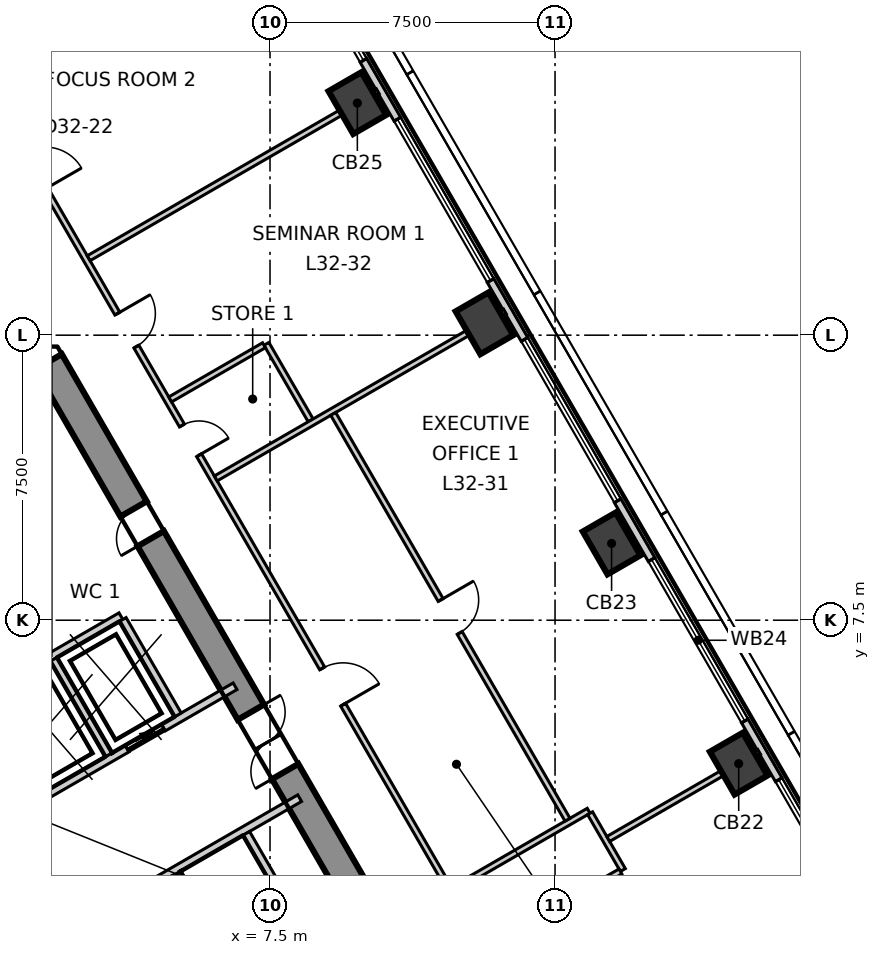
"""IFC4 building model, lengths in metres.
Left out: names, types, materials, properties, quantities, classifications, styles, units other than length and angle.
Written with IfcOpenShell. Run it as: python <this file> out.ifc"""

import sys

from ifc_helpers import new_model, si_unit, direction, frame, frame_2d, origin, origin_2d, place, context, subcontext, project, spatial, polyline, rectangle, outline, extrude, element, fill, save


model = new_model("IFC4")
c1 = context("Model", 3, precision=1e-05, world=origin(), true_north=direction((0.0, 1.0)))
c2 = subcontext(c1, "Body", "Model", "MODEL_VIEW")
j1 = project(units=[si_unit("LENGTHUNIT", "METRE"), si_unit("PLANEANGLEUNIT", "RADIAN")], contexts=[c1])
p1 = place(None, origin())
s1 = spatial("IfcSite", under=j1, at=p1, CompositionType="ELEMENT")
p2 = place(p1, origin())
s2 = spatial("IfcBuilding", under=s1, at=p2, CompositionType="ELEMENT")
p3 = place(p2, frame((0.0, 0.0, 140.3)))
s3 = spatial("IfcBuildingStorey", under=s2, at=p3, CompositionType="ELEMENT", Elevation=140.3)
p4 = place(p3, frame((1.674, 14.3, -0.3), z_axis=(0.0, 0.0, 1.0), x_axis=(-1.0, 0.0, 0.0)))
e1 = element("IfcWall", 1, at=p4, inside=s3, PredefinedType="SHEAR", context=c2, shape_type="SweptSolid", body=[
    extrude(outline(polyline([(-0.231, -0.4), (1.674, -0.4), (3.579, -0.4), (3.117, 0.4), (1.674, 0.4), (0.231, 0.4), (-0.231, -0.4)])), origin(), (0.0, 0.0, 1.0), 4.0),
])
p5 = place(p4, frame((0.974, 0.0, 0.3)))
e2 = element("IfcOpeningElement", 2, at=p5, cuts=e1, PredefinedType="OPENING", context=c2, shape_type="SweptSolid", body=[
    extrude(rectangle(XDim=1.4, YDim=2.1, at=frame_2d((0.7, 1.05))), frame((0.0, 0.41, 0.0), z_axis=(0.0, -1.0, 0.0), x_axis=(1.0, 0.0, 0.0)), (0.0, 0.0, 1.0), 0.82),
])
p6 = place(p3, frame((13.221, -5.7, -0.3), z_axis=(0.0, 0.0, 1.0), x_axis=(-0.499995765644, 0.866027848477, 0.0)))
e3 = element("IfcWall", 3, at=p6, inside=s3, PredefinedType="SHEAR", context=c2, shape_type="SweptSolid", body=[
    extrude(outline(polyline([(-0.231, -0.4), (1.732, -0.4), (3.695, -0.4), (5.658, -0.4), (7.621, -0.4), (9.584, -0.4), (11.547, -0.4), (13.51, -0.4), (15.473, -0.4), (17.436, -0.4), (19.399, -0.4), (21.362, -0.4), (23.325, -0.4), (22.863, 0.4), (20.977, 0.4), (19.091, 0.4), (17.205, 0.4), (15.319, 0.4), (13.433, 0.4), (11.547, 0.4), (9.661, 0.4), (7.775, 0.4), (5.889, 0.4), (4.003, 0.4), (2.117, 0.4), (0.231, 0.4), (-0.231, -0.4)])), origin(), (0.0, 0.0, 1.0), 4.0),
])
p7 = place(p6, frame((10.647, 0.0, 0.3)))
e4 = element("IfcOpeningElement", 4, at=p7, cuts=e3, PredefinedType="OPENING", context=c2, shape_type="SweptSolid", body=[
    extrude(rectangle(XDim=1.8, YDim=2.1, at=frame_2d((0.9, 1.05))), frame((0.0, 0.41, 0.0), z_axis=(0.0, -1.0, 0.0), x_axis=(1.0, 0.0, 0.0)), (0.0, 0.0, 1.0), 0.82),
])
p8 = place(p6, frame((17.721, 0.0, 0.3)))
e5 = element("IfcOpeningElement", 5, at=p8, cuts=e3, PredefinedType="OPENING", context=c2, shape_type="SweptSolid", body=[
    extrude(rectangle(XDim=0.9, YDim=2.1, at=frame_2d((0.45, 1.05))), frame((0.0, 0.41, 0.0), z_axis=(0.0, -1.0, 0.0), x_axis=(1.0, 0.0, 0.0)), (0.0, 0.0, 1.0), 0.82),
])
for number, where, z_axis, x_axis in (
    (6, (19.833, 3.726, -0.3), (0.0, 0.0, 1.0), (-0.5, 0.866, 0.0)),
    (7, (16.488, 9.52, -0.3), (0.0, 0.0, 1.0), (-0.5, 0.866, 0.0)),
    (8, (13.143, 15.313, -0.3), (0.0, 0.0, 1.0), (-0.5, 0.866, 0.0)),
    (9, (9.798, 21.107, -0.3), (0.0, 0.0, 1.0), (-0.5, 0.866, 0.0)),
):
    element("IfcColumn", number, at=place(p3, frame(where, z_axis=z_axis, x_axis=x_axis)), inside=s3, PredefinedType="COLUMN", context=c2, shape_type="SweptSolid", body=[
        extrude(rectangle(XDim=1.3, YDim=1.0, at=origin_2d()), origin(), (0.0, 0.0, 1.0), 4.0),
    ])
p9 = place(p3, frame((31.126, -14.433, 0.0), z_axis=(0.0, 0.0, 1.0), x_axis=(-0.500008098571, 0.866020728022, 0.0)))
e10 = element("IfcWall", 10, at=p9, inside=s3, PredefinedType="ELEMENTEDWALL", context=c2, shape_type="SweptSolid", body=[
    extrude(rectangle(XDim=56.105, YDim=0.2, at=frame_2d((28.052, 0.0))), origin(), (0.0, 0.0, 1.0), 3.7),
])
p10 = place(p9, frame((2.198, 0.0, 0.9)))
e11 = element("IfcOpeningElement", 11, at=p10, cuts=e10, PredefinedType="OPENING", context=c2, shape_type="SweptSolid", body=[
    extrude(rectangle(XDim=4.9, YDim=2.5, at=frame_2d((2.45, 1.25))), frame((0.0, 0.11, 0.0), z_axis=(0.0, -1.0, 0.0), x_axis=(1.0, 0.0, 0.0)), (0.0, 0.0, 1.0), 0.22),
])
p11 = place(p9, frame((8.888, 0.0, 0.9)))
e12 = element("IfcOpeningElement", 12, at=p11, cuts=e10, PredefinedType="OPENING", context=c2, shape_type="SweptSolid", body=[
    extrude(rectangle(XDim=4.9, YDim=2.5, at=frame_2d((2.45, 1.25))), frame((0.0, 0.11, 0.0), z_axis=(0.0, -1.0, 0.0), x_axis=(1.0, 0.0, 0.0)), (0.0, 0.0, 1.0), 0.22),
])
p12 = place(p9, frame((15.578, 0.0, 0.9)))
e13 = element("IfcOpeningElement", 13, at=p12, cuts=e10, PredefinedType="OPENING", context=c2, shape_type="SweptSolid", body=[
    extrude(rectangle(XDim=4.9, YDim=2.5, at=frame_2d((2.45, 1.25))), frame((0.0, 0.11, 0.0), z_axis=(0.0, -1.0, 0.0), x_axis=(1.0, 0.0, 0.0)), (0.0, 0.0, 1.0), 0.22),
])
p13 = place(p9, frame((22.267, 0.0, 0.9)))
e14 = element("IfcOpeningElement", 14, at=p13, cuts=e10, PredefinedType="OPENING", context=c2, shape_type="SweptSolid", body=[
    extrude(rectangle(XDim=4.9, YDim=2.5, at=frame_2d((2.45, 1.25))), frame((0.0, 0.11, 0.0), z_axis=(0.0, -1.0, 0.0), x_axis=(1.0, 0.0, 0.0)), (0.0, 0.0, 1.0), 0.22),
])
p14 = place(p9, frame((28.957, 0.0, 0.9)))
e15 = element("IfcOpeningElement", 15, at=p14, cuts=e10, PredefinedType="OPENING", context=c2, shape_type="SweptSolid", body=[
    extrude(rectangle(XDim=4.9, YDim=2.5, at=frame_2d((2.45, 1.25))), frame((0.0, 0.11, 0.0), z_axis=(0.0, -1.0, 0.0), x_axis=(1.0, 0.0, 0.0)), (0.0, 0.0, 1.0), 0.22),
])
p15 = place(p9, frame((35.647, 0.0, 0.9)))
e16 = element("IfcOpeningElement", 16, at=p15, cuts=e10, PredefinedType="OPENING", context=c2, shape_type="SweptSolid", body=[
    extrude(rectangle(XDim=4.9, YDim=2.5, at=frame_2d((2.45, 1.25))), frame((0.0, 0.11, 0.0), z_axis=(0.0, -1.0, 0.0), x_axis=(1.0, 0.0, 0.0)), (0.0, 0.0, 1.0), 0.22),
])
p16 = place(p9, frame((42.337, 0.0, 0.9)))
e17 = element("IfcOpeningElement", 17, at=p16, cuts=e10, PredefinedType="OPENING", context=c2, shape_type="SweptSolid", body=[
    extrude(rectangle(XDim=4.9, YDim=2.5, at=frame_2d((2.45, 1.25))), frame((0.0, 0.11, 0.0), z_axis=(0.0, -1.0, 0.0), x_axis=(1.0, 0.0, 0.0)), (0.0, 0.0, 1.0), 0.22),
])
p17 = place(p9, frame((49.027, 0.0, 0.9)))
e18 = element("IfcOpeningElement", 18, at=p17, cuts=e10, PredefinedType="OPENING", context=c2, shape_type="SweptSolid", body=[
    extrude(rectangle(XDim=4.9, YDim=2.5, at=frame_2d((2.45, 1.25))), frame((0.0, 0.11, 0.0), z_axis=(0.0, -1.0, 0.0), x_axis=(1.0, 0.0, 0.0)), (0.0, 0.0, 1.0), 0.22),
])
p18 = place(p3, frame((0.076, 21.468, 0.0), z_axis=(0.0, 0.0, 1.0), x_axis=(0.499999691263, -0.866025582034, 0.0)))
e19 = element("IfcWall", 19, at=p18, inside=s3, PredefinedType="PARTITIONING", context=c2, shape_type="SweptSolid", body=[
    extrude(rectangle(XDim=24.342, YDim=0.15, at=frame_2d((12.171, 0.0))), origin(), (0.0, 0.0, 1.0), 3.7),
])
p19 = place(p18, frame((17.594, 0.0, 0.0)))
e20 = element("IfcOpeningElement", 20, at=p19, cuts=e19, PredefinedType="OPENING", context=c2, shape_type="SweptSolid", body=[
    extrude(rectangle(XDim=1.1, YDim=2.1, at=frame_2d((0.55, 1.05))), frame((0.0, 0.085, 0.0), z_axis=(0.0, -1.0, 0.0), x_axis=(1.0, 0.0, 0.0)), (0.0, 0.0, 1.0), 0.17),
])
p20 = place(p18, frame((6.814, 0.0, 0.0)))
e21 = element("IfcOpeningElement", 21, at=p20, cuts=e19, PredefinedType="OPENING", context=c2, shape_type="SweptSolid", body=[
    extrude(rectangle(XDim=1.0, YDim=2.1, at=frame_2d((0.5, 1.05))), frame((0.0, 0.085, 0.0), z_axis=(0.0, -1.0, 0.0), x_axis=(1.0, 0.0, 0.0)), (0.0, 0.0, 1.0), 0.17),
])
p21 = place(p18, frame((10.214, 0.0, 0.0)))
e22 = element("IfcOpeningElement", 22, at=p21, cuts=e19, PredefinedType="OPENING", context=c2, shape_type="SweptSolid", body=[
    extrude(rectangle(XDim=0.9, YDim=2.1, at=frame_2d((0.45, 1.05))), frame((0.0, 0.085, 0.0), z_axis=(0.0, -1.0, 0.0), x_axis=(1.0, 0.0, 0.0)), (0.0, 0.0, 1.0), 0.17),
])
p22 = place(p18, frame((1.924, 0.0, 0.0)))
e23 = element("IfcOpeningElement", 23, at=p22, cuts=e19, PredefinedType="OPENING", context=c2, shape_type="SweptSolid", body=[
    extrude(rectangle(XDim=1.1, YDim=2.1, at=frame_2d((0.55, 1.05))), frame((0.0, 0.085, 0.0), z_axis=(0.0, -1.0, 0.0), x_axis=(1.0, 0.0, 0.0)), (0.0, 0.0, 1.0), 0.17),
])
p23 = place(p3, frame((2.728, 17.025, 0.0), z_axis=(0.0, 0.0, 1.0), x_axis=(0.866014327354, 0.50001918445, 0.0)))
e24 = element("IfcWall", 24, at=p23, inside=s3, PredefinedType="PARTITIONING", context=c2, shape_type="SweptSolid", body=[
    extrude(rectangle(XDim=8.784, YDim=0.15, at=frame_2d((4.392, 0.0))), origin(), (0.0, 0.0, 1.0), 3.7),
])
p24 = place(p3, frame((7.406, 14.772, 0.0), z_axis=(0.0, 0.0, 1.0), x_axis=(0.50029509392, -0.865854964183, 0.0)))
e25 = element("IfcWall", 25, at=p24, inside=s3, PredefinedType="PARTITIONING", context=c2, shape_type="SweptSolid", body=[
    extrude(rectangle(XDim=2.325, YDim=0.15, at=frame_2d((1.162, 0.0))), origin(), (0.0, 0.0, 1.0), 3.7),
])
p25 = place(p3, frame((4.873, 13.31, 0.0), z_axis=(0.0, 0.0, 1.0), x_axis=(0.866004402611, 0.500036373335, 0.0)))
e26 = element("IfcWall", 26, at=p25, inside=s3, PredefinedType="PARTITIONING", context=c2, shape_type="SweptSolid", body=[
    extrude(rectangle(XDim=2.85, YDim=0.15, at=frame_2d((1.425, 0.0))), origin(), (0.0, 0.0, 1.0), 3.7),
])
p26 = place(p3, frame((6.073, 11.231, 0.0), z_axis=(0.0, 0.0, 1.0), x_axis=(0.866014327354, 0.50001918445, 0.0)))
e27 = element("IfcWall", 27, at=p26, inside=s3, PredefinedType="PARTITIONING", context=c2, shape_type="SweptSolid", body=[
    extrude(rectangle(XDim=8.784, YDim=0.15, at=frame_2d((4.392, 0.0))), origin(), (0.0, 0.0, 1.0), 3.7),
])
p27 = place(p3, frame((12.314, 0.424, 0.0), z_axis=(0.0, 0.0, 1.0), x_axis=(0.865997263264, 0.500048737644, 0.0)))
e28 = element("IfcWall", 28, at=p27, inside=s3, PredefinedType="PARTITIONING", context=c2, shape_type="SweptSolid", body=[
    extrude(rectangle(XDim=4.124, YDim=0.15, at=frame_2d((2.062, 0.0))), origin(), (0.0, 0.0, 1.0), 3.7),
])
p28 = place(p3, frame((15.923, 2.421, 0.0), z_axis=(0.0, 0.0, 1.0), x_axis=(0.499702028684, -0.866197369269, 0.0)))
e29 = element("IfcWall", 29, at=p28, inside=s3, PredefinedType="PARTITIONING", context=c2, shape_type="SweptSolid", body=[
    extrude(rectangle(XDim=1.725, YDim=0.15, at=frame_2d((0.862, 0.0))), origin(), (0.0, 0.0, 1.0), 3.7),
])
p29 = place(p3, frame((16.4, 1.744, 0.0), z_axis=(0.0, 0.0, 1.0), x_axis=(0.866045467449, 0.499965247104, 0.0)))
e30 = element("IfcWall", 30, at=p29, inside=s3, PredefinedType="PARTITIONING", context=c2, shape_type="SweptSolid", body=[
    extrude(rectangle(XDim=4.584, YDim=0.15, at=frame_2d((2.292, 0.0))), origin(), (0.0, 0.0, 1.0), 3.7),
])
p30 = place(p3, frame((13.214, -1.135, 0.0), z_axis=(0.0, 0.0, 1.0), x_axis=(0.865940524948, 0.500146985649, 0.0)))
e31 = element("IfcWall", 31, at=p30, inside=s3, PredefinedType="PARTITIONING", context=c2, shape_type="SweptSolid", body=[
    extrude(rectangle(XDim=4.049, YDim=0.15, at=frame_2d((2.024, 0.0))), origin(), (0.0, 0.0, 1.0), 3.7),
])
p31 = place(p3, frame((9.163, 12.929, 0.0), z_axis=(0.0, 0.0, 1.0), x_axis=(0.499991554064, -0.866030279993, 0.0)))
e32 = element("IfcWall", 32, at=p31, inside=s3, PredefinedType="PARTITIONING", context=c2, shape_type="SweptSolid", body=[
    extrude(rectangle(XDim=12.33, YDim=0.15, at=frame_2d((6.165, 0.0))), origin(), (0.0, 0.0, 1.0), 3.7),
])
p32 = place(p31, frame((5.655, 0.0, 0.0)))
e33 = element("IfcOpeningElement", 33, at=p32, cuts=e32, PredefinedType="OPENING", context=c2, shape_type="SweptSolid", body=[
    extrude(rectangle(XDim=1.0, YDim=2.1, at=frame_2d((0.5, 1.05))), frame((0.0, 0.085, 0.0), z_axis=(0.0, -1.0, 0.0), x_axis=(1.0, 0.0, 0.0)), (0.0, 0.0, 1.0), 0.17),
])
p33 = place(p3, frame((-0.002, 5.542, 0.0), z_axis=(0.0, 0.0, 1.0), x_axis=(0.866103910842, 0.499863997127, 0.0)))
e34 = element("IfcWall", 34, at=p33, inside=s3, PredefinedType="SOLIDWALL", context=c2, shape_type="SweptSolid", body=[
    extrude(rectangle(XDim=4.131, YDim=0.2, at=frame_2d((2.065, 0.0))), origin(), (0.0, 0.0, 1.0), 3.7),
])
p34 = place(p3, frame((1.577, 2.874, 0.0), z_axis=(0.0, 0.0, 1.0), x_axis=(0.866073694534, 0.499916348638, 0.0)))
e35 = element("IfcWall", 35, at=p34, inside=s3, PredefinedType="SOLIDWALL", context=c2, shape_type="SweptSolid", body=[
    extrude(rectangle(XDim=5.777, YDim=0.2, at=frame_2d((2.888, 0.0))), origin(), (0.0, 0.0, 1.0), 3.7),
])
p35 = place(p34, frame((2.497, 0.0, 0.0)))
e36 = element("IfcOpeningElement", 36, at=p35, cuts=e35, PredefinedType="OPENING", context=c2, shape_type="SweptSolid", body=[
    extrude(rectangle(XDim=1.1, YDim=2.1, at=frame_2d((0.55, 1.05))), frame((0.0, 0.11, 0.0), z_axis=(0.0, -1.0, 0.0), x_axis=(1.0, 0.0, 0.0)), (0.0, 0.0, 1.0), 0.22),
])
p36 = place(p3, frame((3.278, -0.071, 0.0), z_axis=(0.0, 0.0, 1.0), x_axis=(0.865929348003, 0.5001663366, 0.0)))
e37 = element("IfcWall", 37, at=p36, inside=s3, PredefinedType="SOLIDWALL", context=c2, shape_type="SweptSolid", body=[
    extrude(rectangle(XDim=5.776, YDim=0.2, at=frame_2d((2.888, 0.0))), origin(), (0.0, 0.0, 1.0), 3.7),
])
p37 = place(p3, frame((3.626, 7.52, 0.0), z_axis=(0.0, 0.0, 1.0), x_axis=(0.500060147554, -0.865990674793, 0.0)))
e38 = element("IfcWall", 38, at=p37, inside=s3, PredefinedType="SOLIDWALL", context=c2, shape_type="SweptSolid", body=[
    extrude(rectangle(XDim=2.9, YDim=0.2, at=frame_2d((1.45, 0.0))), origin(), (0.0, 0.0, 1.0), 3.7),
])
p38 = place(p3, frame((6.876, 1.891, 0.0), z_axis=(0.0, 0.0, 1.0), x_axis=(0.499990139034, -0.866031096941, 0.0)))
e39 = element("IfcWall", 39, at=p38, inside=s3, PredefinedType="SOLIDWALL", context=c2, shape_type="SweptSolid", body=[
    extrude(rectangle(XDim=3.0, YDim=0.2, at=frame_2d((1.5, 0.0))), origin(), (0.0, 0.0, 1.0), 3.7),
])
for number, where, z_axis, x_axis in (
    (40, (1.807, 6.47, 0.0), (0.0, 0.0, 1.0), (0.5, -0.866, 0.0)),
    (41, (5.057, 0.841, 0.0), (0.0, 0.0, 1.0), (0.5, -0.866, 0.0)),
):
    element("IfcWall", number, at=place(p3, frame(where, z_axis=z_axis, x_axis=x_axis)), inside=s3, PredefinedType="SOLIDWALL", context=c2, shape_type="SweptSolid", body=[
        extrude(rectangle(XDim=2.9, YDim=0.2, at=frame_2d((1.45, 0.0))), origin(), (0.0, 0.0, 1.0), 3.7),
    ])
p39 = place(p12, origin())
e42 = element("IfcWindow", 42, at=p39, inside=s3, PartitioningType="SINGLE_PANEL", PredefinedType="WINDOW", context=c2, shape_type="SweptSolid", body=[
    extrude(rectangle(XDim=4.9, YDim=2.5, at=frame_2d((2.45, 1.25))), frame((0.0, 0.03, 0.0), z_axis=(0.0, -1.0, 0.0), x_axis=(1.0, 0.0, 0.0)), (0.0, 0.0, 1.0), 0.06),
])
fill(e13, e42)
p40 = place(p13, origin())
e43 = element("IfcWindow", 43, at=p40, inside=s3, PartitioningType="SINGLE_PANEL", PredefinedType="WINDOW", context=c2, shape_type="SweptSolid", body=[
    extrude(rectangle(XDim=4.9, YDim=2.5, at=frame_2d((2.45, 1.25))), frame((0.0, 0.03, 0.0), z_axis=(0.0, -1.0, 0.0), x_axis=(1.0, 0.0, 0.0)), (0.0, 0.0, 1.0), 0.06),
])
fill(e14, e43)
p41 = place(p14, origin())
e44 = element("IfcWindow", 44, at=p41, inside=s3, PartitioningType="SINGLE_PANEL", PredefinedType="WINDOW", context=c2, shape_type="SweptSolid", body=[
    extrude(rectangle(XDim=4.9, YDim=2.5, at=frame_2d((2.45, 1.25))), frame((0.0, 0.03, 0.0), z_axis=(0.0, -1.0, 0.0), x_axis=(1.0, 0.0, 0.0)), (0.0, 0.0, 1.0), 0.06),
])
fill(e15, e44)
p42 = place(p15, origin())
e45 = element("IfcWindow", 45, at=p42, inside=s3, PartitioningType="SINGLE_PANEL", PredefinedType="WINDOW", context=c2, shape_type="SweptSolid", body=[
    extrude(rectangle(XDim=4.9, YDim=2.5, at=frame_2d((2.45, 1.25))), frame((0.0, 0.03, 0.0), z_axis=(0.0, -1.0, 0.0), x_axis=(1.0, 0.0, 0.0)), (0.0, 0.0, 1.0), 0.06),
])
fill(e16, e45)
p43 = place(p16, origin())
e46 = element("IfcWindow", 46, at=p43, inside=s3, PartitioningType="SINGLE_PANEL", PredefinedType="WINDOW", context=c2, shape_type="SweptSolid", body=[
    extrude(rectangle(XDim=4.9, YDim=2.5, at=frame_2d((2.45, 1.25))), frame((0.0, 0.03, 0.0), z_axis=(0.0, -1.0, 0.0), x_axis=(1.0, 0.0, 0.0)), (0.0, 0.0, 1.0), 0.06),
])
fill(e17, e46)
p44 = place(p35, origin())
e47 = element("IfcDoor", 47, at=p44, inside=s3, OperationType="SLIDING_TO_LEFT", PredefinedType="DOOR", context=c2, shape_type="SweptSolid", body=[
    extrude(rectangle(XDim=1.1, YDim=2.1, at=frame_2d((0.55, 1.05))), frame((0.0, 0.025, 0.0), z_axis=(0.0, -1.0, 0.0), x_axis=(1.0, 0.0, 0.0)), (0.0, 0.0, 1.0), 0.05),
])
fill(e36, e47)
p45 = place(p19, origin())
e48 = element("IfcDoor", 48, at=p45, inside=s3, OperationType="SINGLE_SWING_LEFT", PredefinedType="DOOR", context=c2, shape_type="SweptSolid", body=[
    extrude(rectangle(XDim=1.1, YDim=2.1, at=frame_2d((0.55, 1.05))), frame((0.0, 0.025, 0.0), z_axis=(0.0, -1.0, 0.0), x_axis=(1.0, 0.0, 0.0)), (0.0, 0.0, 1.0), 0.05),
])
fill(e20, e48)
p46 = place(p32, origin())
e49 = element("IfcDoor", 49, at=p46, inside=s3, OperationType="SINGLE_SWING_RIGHT", PredefinedType="DOOR", context=c2, shape_type="SweptSolid", body=[
    extrude(rectangle(XDim=1.0, YDim=2.1, at=frame_2d((0.5, 1.05))), frame((0.0, 0.025, 0.0), z_axis=(0.0, -1.0, 0.0), x_axis=(1.0, 0.0, 0.0)), (0.0, 0.0, 1.0), 0.05),
])
fill(e33, e49)
p47 = place(p20, origin())
e50 = element("IfcDoor", 50, at=p47, inside=s3, OperationType="SINGLE_SWING_RIGHT", PredefinedType="DOOR", context=c2, shape_type="SweptSolid", body=[
    extrude(rectangle(XDim=1.0, YDim=2.1, at=frame_2d((0.5, 1.05))), frame((0.0, 0.025, 0.0), z_axis=(0.0, -1.0, 0.0), x_axis=(1.0, 0.0, 0.0)), (0.0, 0.0, 1.0), 0.05),
])
fill(e21, e50)
p48 = place(p21, origin())
e51 = element("IfcDoor", 51, at=p48, inside=s3, OperationType="SINGLE_SWING_LEFT", PredefinedType="DOOR", context=c2, shape_type="SweptSolid", body=[
    extrude(rectangle(XDim=0.9, YDim=2.1, at=frame_2d((0.45, 1.05))), frame((0.0, 0.025, 0.0), z_axis=(0.0, -1.0, 0.0), x_axis=(1.0, 0.0, 0.0)), (0.0, 0.0, 1.0), 0.05),
])
fill(e22, e51)
p49 = place(p7, origin())
e52 = element("IfcDoor", 52, at=p49, inside=s3, OperationType="DOUBLE_DOOR_SINGLE_SWING", PredefinedType="DOOR", context=c2, shape_type="SweptSolid", body=[
    extrude(rectangle(XDim=1.8, YDim=2.1, at=frame_2d((0.9, 1.05))), frame((0.0, 0.025, 0.0), z_axis=(0.0, -1.0, 0.0), x_axis=(1.0, 0.0, 0.0)), (0.0, 0.0, 1.0), 0.05),
])
fill(e4, e52)
p50 = place(p8, origin())
e53 = element("IfcDoor", 53, at=p50, inside=s3, OperationType="SINGLE_SWING_RIGHT", PredefinedType="DOOR", context=c2, shape_type="SweptSolid", body=[
    extrude(rectangle(XDim=0.9, YDim=2.1, at=frame_2d((0.45, 1.05))), frame((0.0, 0.025, 0.0), z_axis=(0.0, -1.0, 0.0), x_axis=(1.0, 0.0, 0.0)), (0.0, 0.0, 1.0), 0.05),
])
fill(e5, e53)
save(model, sys.argv[1])
